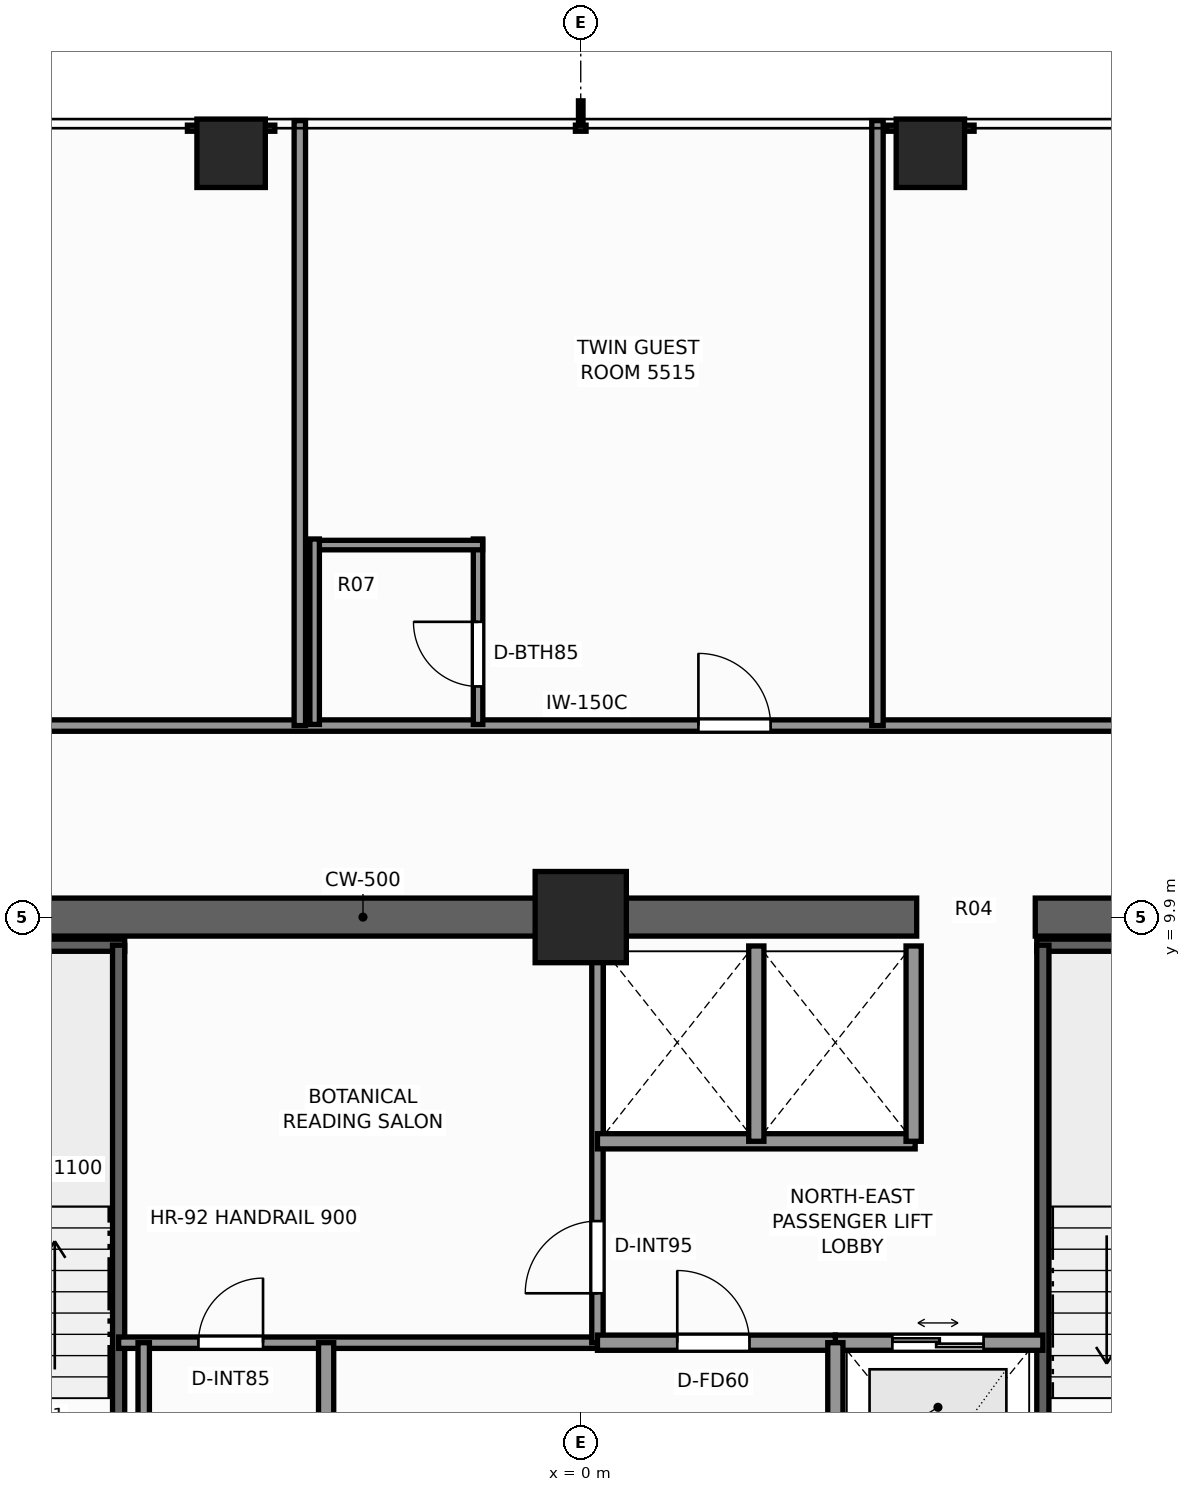
"""IFC4 building model, lengths in metres.
Left out: names, types, materials, properties, quantities, classifications, styles, units other than length and angle.
Written with IfcOpenShell. Run it as: python <this file> out.ifc"""

import sys

from ifc_helpers import new_model, si_unit, direction, frame, frame_2d, origin, origin_2d, place, context, subcontext, project, spatial, rectangle, extrude, element, fill, save


model = new_model("IFC4")
c1 = context("Model", 3, precision=1e-05, world=origin(), true_north=direction((0.0, 1.0)))
c2 = subcontext(c1, "Body", "Model", "MODEL_VIEW")
j1 = project(units=[si_unit("LENGTHUNIT", "METRE"), si_unit("PLANEANGLEUNIT", "RADIAN")], contexts=[c1])
p1 = place(None, origin())
s1 = spatial("IfcSite", under=j1, at=p1, CompositionType="ELEMENT")
p2 = place(p1, origin())
s2 = spatial("IfcBuilding", under=s1, at=p2, CompositionType="ELEMENT")
p3 = place(p2, frame((0.0, 0.0, 189.9)))
s3 = spatial("IfcBuildingStorey", under=s2, at=p3, CompositionType="ELEMENT", Elevation=189.9)
p4 = place(p3, frame((-10.15, 9.9, 0.0), z_axis=(0.0, 0.0, 1.0), x_axis=(1.0, 0.0, 0.0)))
e1 = element("IfcWall", 1, at=p4, inside=s3, PredefinedType="SHEAR", context=c2, shape_type="SweptSolid", body=[
    extrude(rectangle(XDim=14.57, YDim=0.5, at=frame_2d((7.285, 0.0))), origin(), (0.0, 0.0, 1.0), 3.3),
])
p5 = place(p3, frame((5.98, 9.9, 0.0), z_axis=(0.0, 0.0, 1.0), x_axis=(1.0, 0.0, 0.0)))
e2 = element("IfcWall", 2, at=p5, inside=s3, PredefinedType="SHEAR", context=c2, shape_type="SweptSolid", body=[
    extrude(rectangle(XDim=4.17, YDim=0.5, at=frame_2d((2.085, 0.0))), origin(), (0.0, 0.0, 1.0), 3.3),
])
p6 = place(p3, frame((0.0, 9.9, 0.0), z_axis=(0.0, 0.0, 1.0), x_axis=(1.0, 0.0, 0.0)))
e3 = element("IfcColumn", 3, at=p6, inside=s3, PredefinedType="COLUMN", context=c2, shape_type="SweptSolid", body=[
    extrude(rectangle(XDim=1.2, YDim=1.2, at=origin_2d()), origin(), (0.0, 0.0, 1.0), 3.3),
])
for number, where, z_axis, x_axis in (
    (4, (-4.6, 19.95, 0.0), (0.0, 0.0, 1.0), (1.0, 0.0, 0.0)),
    (5, (4.6, 19.95, 0.0), (0.0, 0.0, 1.0), (1.0, 0.0, 0.0)),
):
    element("IfcColumn", number, at=place(p3, frame(where, z_axis=z_axis, x_axis=x_axis)), inside=s3, PredefinedType="COLUMN", context=c2, shape_type="SweptSolid", body=[
        extrude(rectangle(XDim=0.9, YDim=0.9, at=origin_2d()), origin(), (0.0, 0.0, 1.0), 3.3),
    ])
p7 = place(p3, frame((-9.52, 9.53, 0.0), z_axis=(0.0, 0.0, 1.0), x_axis=(1.0, 0.0, 0.0)))
e6 = element("IfcWall", 6, at=p7, inside=s3, PredefinedType="SHEAR", context=c2, shape_type="SweptSolid", body=[
    extrude(rectangle(XDim=3.52, YDim=0.16, at=frame_2d((1.76, 0.0))), origin(), (0.0, 0.0, 1.0), 3.3),
])
p8 = place(p3, frame((-6.08, 1.97, 0.0), z_axis=(0.0, 0.0, 1.0), x_axis=(0.0, 1.0, 0.0)))
e7 = element("IfcWall", 7, at=p8, inside=s3, PredefinedType="SHEAR", context=c2, shape_type="SweptSolid", body=[
    extrude(rectangle(XDim=7.56, YDim=0.16, at=frame_2d((3.78, 0.0))), origin(), (0.0, 0.0, 1.0), 3.3),
])
p9 = place(p3, frame((6.0, 9.53, 0.0), z_axis=(0.0, 0.0, 1.0), x_axis=(1.0, 0.0, 0.0)))
e8 = element("IfcWall", 8, at=p9, inside=s3, PredefinedType="SHEAR", context=c2, shape_type="SweptSolid", body=[
    extrude(rectangle(XDim=3.52, YDim=0.16, at=frame_2d((1.76, 0.0))), origin(), (0.0, 0.0, 1.0), 3.3),
])
p10 = place(p3, frame((6.08, 1.97, 0.0), z_axis=(0.0, 0.0, 1.0), x_axis=(0.0, 1.0, 0.0)))
e9 = element("IfcWall", 9, at=p10, inside=s3, PredefinedType="SHEAR", context=c2, shape_type="SweptSolid", body=[
    extrude(rectangle(XDim=7.56, YDim=0.16, at=frame_2d((3.78, 0.0))), origin(), (0.0, 0.0, 1.0), 3.3),
])
p11 = place(p3, frame((3.35, 4.3, 0.0), z_axis=(0.0, 0.0, 1.0), x_axis=(1.0, 0.0, 0.0)))
e10 = element("IfcWall", 10, at=p11, inside=s3, PredefinedType="SOLIDWALL", context=c2, shape_type="SweptSolid", body=[
    extrude(rectangle(XDim=2.73, YDim=0.2, at=frame_2d((1.365, 0.0))), origin(), (0.0, 0.0, 1.0), 3.08),
])
p12 = place(p11, frame((0.75, 0.0, 0.0)))
e11 = element("IfcOpeningElement", 11, at=p12, cuts=e10, PredefinedType="OPENING", context=c2, shape_type="SweptSolid", body=[
    extrude(rectangle(XDim=1.2, YDim=2.25, at=frame_2d((0.6, 1.125))), frame((0.0, 0.11, 0.0), z_axis=(0.0, -1.0, 0.0), x_axis=(1.0, 0.0, 0.0)), (0.0, 0.0, 1.0), 0.22),
])
p13 = place(p3, frame((-6.08, 4.3, 0.0), z_axis=(0.0, 0.0, 1.0), x_axis=(1.0, 0.0, 0.0)))
e12 = element("IfcWall", 12, at=p13, inside=s3, PredefinedType="PARTITIONING", context=c2, shape_type="SweptSolid", body=[
    extrude(rectangle(XDim=6.3, YDim=0.15, at=frame_2d((3.15, 0.0))), origin(), (0.0, 0.0, 1.0), 3.08),
])
p14 = place(p13, frame((1.05, 0.0, 0.0)))
e13 = element("IfcOpeningElement", 13, at=p14, cuts=e12, PredefinedType="OPENING", context=c2, shape_type="SweptSolid", body=[
    extrude(rectangle(XDim=0.85, YDim=2.03, at=frame_2d((0.425, 1.015))), frame((0.0, 0.085, 0.0), z_axis=(0.0, -1.0, 0.0), x_axis=(1.0, 0.0, 0.0)), (0.0, 0.0, 1.0), 0.17),
])
p15 = place(p3, frame((0.22, 4.3, 0.0), z_axis=(0.0, 0.0, 1.0), x_axis=(0.0, 1.0, 0.0)))
e14 = element("IfcWall", 14, at=p15, inside=s3, PredefinedType="PARTITIONING", context=c2, shape_type="SweptSolid", body=[
    extrude(rectangle(XDim=5.22, YDim=0.15, at=frame_2d((2.61, 0.0))), origin(), (0.0, 0.0, 1.0), 3.08),
])
p16 = place(p15, frame((0.65, 0.0, 0.0)))
e15 = element("IfcOpeningElement", 15, at=p16, cuts=e14, PredefinedType="OPENING", context=c2, shape_type="SweptSolid", body=[
    extrude(rectangle(XDim=0.95, YDim=2.06, at=frame_2d((0.475, 1.03))), frame((0.0, 0.085, 0.0), z_axis=(0.0, -1.0, 0.0), x_axis=(1.0, 0.0, 0.0)), (0.0, 0.0, 1.0), 0.17),
])
p17 = place(p3, frame((0.22, 6.95, 0.0), z_axis=(0.0, 0.0, 1.0), x_axis=(1.0, 0.0, 0.0)))
e16 = element("IfcWall", 16, at=p17, inside=s3, PredefinedType="SOLIDWALL", context=c2, shape_type="SweptSolid", body=[
    extrude(rectangle(XDim=4.18, YDim=0.2, at=frame_2d((2.09, 0.0))), origin(), (0.0, 0.0, 1.0), 3.08),
])
for number, where, z_axis, x_axis in (
    (17, (4.38, 6.95, 0.0), (0.0, 0.0, 1.0), (0.0, 1.0, 0.0)),
    (18, (2.31, 6.95, 0.0), (0.0, 0.0, 1.0), (0.0, 1.0, 0.0)),
):
    element("IfcWall", number, at=place(p3, frame(where, z_axis=z_axis, x_axis=x_axis)), inside=s3, PredefinedType="SOLIDWALL", context=c2, shape_type="SweptSolid", body=[
        extrude(rectangle(XDim=2.57, YDim=0.2, at=frame_2d((1.285, 0.0))), origin(), (0.0, 0.0, 1.0), 3.08),
    ])
p18 = place(p3, frame((0.22, 4.3, 0.0), z_axis=(0.0, 0.0, 1.0), x_axis=(1.0, 0.0, 0.0)))
e19 = element("IfcWall", 19, at=p18, inside=s3, PredefinedType="SOLIDWALL", context=c2, shape_type="SweptSolid", body=[
    extrude(rectangle(XDim=3.13, YDim=0.2, at=frame_2d((1.565, 0.0))), origin(), (0.0, 0.0, 1.0), 3.08),
])
p19 = place(p18, frame((1.05, 0.0, 0.0)))
e20 = element("IfcOpeningElement", 20, at=p19, cuts=e19, PredefinedType="OPENING", context=c2, shape_type="SweptSolid", body=[
    extrude(rectangle(XDim=0.95, YDim=2.06, at=frame_2d((0.475, 1.03))), frame((0.0, 0.11, 0.0), z_axis=(0.0, -1.0, 0.0), x_axis=(1.0, 0.0, 0.0)), (0.0, 0.0, 1.0), 0.22),
])
for number, where, z_axis, x_axis in (
    (21, (-3.35, 1.1, 0.0), (0.0, 0.0, 1.0), (0.0, 1.0, 0.0)),
    (22, (3.35, 1.1, 0.0), (0.0, 0.0, 1.0), (0.0, 1.0, 0.0)),
):
    element("IfcWall", number, at=place(p3, frame(where, z_axis=z_axis, x_axis=x_axis)), inside=s3, PredefinedType="SOLIDWALL", context=c2, shape_type="SweptSolid", body=[
        extrude(rectangle(XDim=3.2, YDim=0.2, at=frame_2d((1.6, 0.0))), origin(), (0.0, 0.0, 1.0), 2.715),
    ])
p20 = place(p3, frame((-5.75, 1.97, 0.0), z_axis=(0.0, 0.0, 1.0), x_axis=(0.0, 1.0, 0.0)))
e23 = element("IfcWall", 23, at=p20, inside=s3, PredefinedType="PARTITIONING", context=c2, shape_type="SweptSolid", body=[
    extrude(rectangle(XDim=2.33, YDim=0.15, at=frame_2d((1.165, 0.0))), origin(), (0.0, 0.0, 1.0), 2.715),
])
p21 = place(p3, frame((-12.42, 12.42, 0.0), z_axis=(0.0, 0.0, 1.0), x_axis=(1.0, 0.0, 0.0)))
e24 = element("IfcWall", 24, at=p21, inside=s3, PredefinedType="PARTITIONING", context=c2, shape_type="SweptSolid", body=[
    extrude(rectangle(XDim=25.0, YDim=0.15, at=frame_2d((12.5, 0.0))), origin(), (0.0, 0.0, 1.0), 2.369),
])
p22 = place(p21, frame((4.435, 0.0, 0.0)))
e25 = element("IfcOpeningElement", 25, at=p22, cuts=e24, PredefinedType="OPENING", context=c2, shape_type="SweptSolid", body=[
    extrude(rectangle(XDim=0.9, YDim=2.06, at=frame_2d((0.45, 1.03))), frame((0.0, 0.085, 0.0), z_axis=(0.0, -1.0, 0.0), x_axis=(1.0, 0.0, 0.0)), (0.0, 0.0, 1.0), 0.17),
])
p23 = place(p21, frame((13.968, 0.0, 0.0)))
e26 = element("IfcOpeningElement", 26, at=p23, cuts=e24, PredefinedType="OPENING", context=c2, shape_type="SweptSolid", body=[
    extrude(rectangle(XDim=0.95, YDim=2.06, at=frame_2d((0.475, 1.03))), frame((0.0, 0.085, 0.0), z_axis=(0.0, -1.0, 0.0), x_axis=(1.0, 0.0, 0.0)), (0.0, 0.0, 1.0), 0.17),
])
p24 = place(p21, frame((19.505, 0.0, 0.0)))
e27 = element("IfcOpeningElement", 27, at=p24, cuts=e24, PredefinedType="OPENING", context=c2, shape_type="SweptSolid", body=[
    extrude(rectangle(XDim=0.9, YDim=2.06, at=frame_2d((0.45, 1.03))), frame((0.0, 0.085, 0.0), z_axis=(0.0, -1.0, 0.0), x_axis=(1.0, 0.0, 0.0)), (0.0, 0.0, 1.0), 0.17),
])
for number, where, z_axis, x_axis in (
    (28, (-3.696, 12.42, 0.0), (0.0, 0.0, 1.0), (0.0, 1.0, 0.0)),
    (29, (3.904, 12.42, 0.0), (0.0, 0.0, 1.0), (0.0, 1.0, 0.0)),
):
    element("IfcWall", number, at=place(p3, frame(where, z_axis=z_axis, x_axis=x_axis)), inside=s3, PredefinedType="PARTITIONING", context=c2, shape_type="SweptSolid", body=[
        extrude(rectangle(XDim=7.96, YDim=0.15, at=frame_2d((3.98, 0.0))), origin(), (0.0, 0.0, 1.0), 2.453),
    ])
p25 = place(p3, frame((-1.351, 12.435, 0.0), z_axis=(0.0, 0.0, 1.0), x_axis=(0.0, 1.0, 0.0)))
e30 = element("IfcWall", 30, at=p25, inside=s3, PredefinedType="PARTITIONING", context=c2, shape_type="SweptSolid", body=[
    extrude(rectangle(XDim=2.44, YDim=0.125, at=frame_2d((1.22, 0.0))), origin(), (0.0, 0.0, 1.0), 3.08),
])
p26 = place(p25, frame((0.5, 0.0, 0.0)))
e31 = element("IfcOpeningElement", 31, at=p26, cuts=e30, PredefinedType="OPENING", context=c2, shape_type="SweptSolid", body=[
    extrude(rectangle(XDim=0.85, YDim=2.03, at=frame_2d((0.425, 1.015))), frame((0.0, 0.073, 0.0), z_axis=(0.0, -1.0, 0.0), x_axis=(1.0, 0.0, 0.0)), (0.0, 0.0, 1.0), 0.145),
])
p27 = place(p3, frame((-3.561, 14.795, 0.0), z_axis=(0.0, 0.0, 1.0), x_axis=(1.0, 0.0, 0.0)))
e32 = element("IfcWall", 32, at=p27, inside=s3, PredefinedType="PARTITIONING", context=c2, shape_type="SweptSolid", body=[
    extrude(rectangle(XDim=2.27, YDim=0.125, at=frame_2d((1.135, 0.0))), origin(), (0.0, 0.0, 1.0), 2.369),
])
p28 = place(p3, frame((-3.501, 12.435, 0.0), z_axis=(0.0, 0.0, 1.0), x_axis=(0.0, 1.0, 0.0)))
e33 = element("IfcWall", 33, at=p28, inside=s3, PredefinedType="PARTITIONING", context=c2, shape_type="SweptSolid", body=[
    extrude(rectangle(XDim=2.44, YDim=0.125, at=frame_2d((1.22, 0.0))), origin(), (0.0, 0.0, 1.0), 3.08),
])
p29 = place(p12, origin())
e34 = element("IfcDoor", 34, at=p29, inside=s3, OperationType="DOUBLE_DOOR_SLIDING", PredefinedType="DOOR", context=c2, shape_type="SweptSolid", body=[
    extrude(rectangle(XDim=1.2, YDim=2.25, at=frame_2d((0.6, 1.125))), frame((0.0, 0.025, 0.0), z_axis=(0.0, -1.0, 0.0), x_axis=(1.0, 0.0, 0.0)), (0.0, 0.0, 1.0), 0.05),
])
fill(e11, e34)
p30 = place(p16, origin())
e35 = element("IfcDoor", 35, at=p30, inside=s3, OperationType="SINGLE_SWING_LEFT", PredefinedType="DOOR", context=c2, shape_type="SweptSolid", body=[
    extrude(rectangle(XDim=0.95, YDim=2.06, at=frame_2d((0.475, 1.03))), frame((0.0, 0.025, 0.0), z_axis=(0.0, -1.0, 0.0), x_axis=(1.0, 0.0, 0.0)), (0.0, 0.0, 1.0), 0.05),
])
fill(e15, e35)
p31 = place(p19, origin())
e36 = element("IfcDoor", 36, at=p31, inside=s3, OperationType="SINGLE_SWING_LEFT", PredefinedType="DOOR", context=c2, shape_type="SweptSolid", body=[
    extrude(rectangle(XDim=0.95, YDim=2.06, at=frame_2d((0.475, 1.03))), frame((0.0, 0.025, 0.0), z_axis=(0.0, -1.0, 0.0), x_axis=(1.0, 0.0, 0.0)), (0.0, 0.0, 1.0), 0.05),
])
fill(e20, e36)
p32 = place(p14, origin())
e37 = element("IfcDoor", 37, at=p32, inside=s3, OperationType="SINGLE_SWING_RIGHT", PredefinedType="DOOR", context=c2, shape_type="SweptSolid", body=[
    extrude(rectangle(XDim=0.85, YDim=2.03, at=frame_2d((0.425, 1.015))), frame((0.0, 0.025, 0.0), z_axis=(0.0, -1.0, 0.0), x_axis=(1.0, 0.0, 0.0)), (0.0, 0.0, 1.0), 0.05),
])
fill(e13, e37)
p33 = place(p26, origin())
e38 = element("IfcDoor", 38, at=p33, inside=s3, OperationType="SINGLE_SWING_RIGHT", PredefinedType="DOOR", context=c2, shape_type="SweptSolid", body=[
    extrude(rectangle(XDim=0.85, YDim=2.03, at=frame_2d((0.425, 1.015))), frame((0.0, 0.025, 0.0), z_axis=(0.0, -1.0, 0.0), x_axis=(1.0, 0.0, 0.0)), (0.0, 0.0, 1.0), 0.05),
])
fill(e31, e38)
p34 = place(p23, origin())
e39 = element("IfcDoor", 39, at=p34, inside=s3, OperationType="SINGLE_SWING_LEFT", PredefinedType="DOOR", context=c2, shape_type="SweptSolid", body=[
    extrude(rectangle(XDim=0.95, YDim=2.06, at=frame_2d((0.475, 1.03))), frame((0.0, 0.025, 0.0), z_axis=(0.0, -1.0, 0.0), x_axis=(1.0, 0.0, 0.0)), (0.0, 0.0, 1.0), 0.05),
])
fill(e26, e39)
save(model, sys.argv[1])
